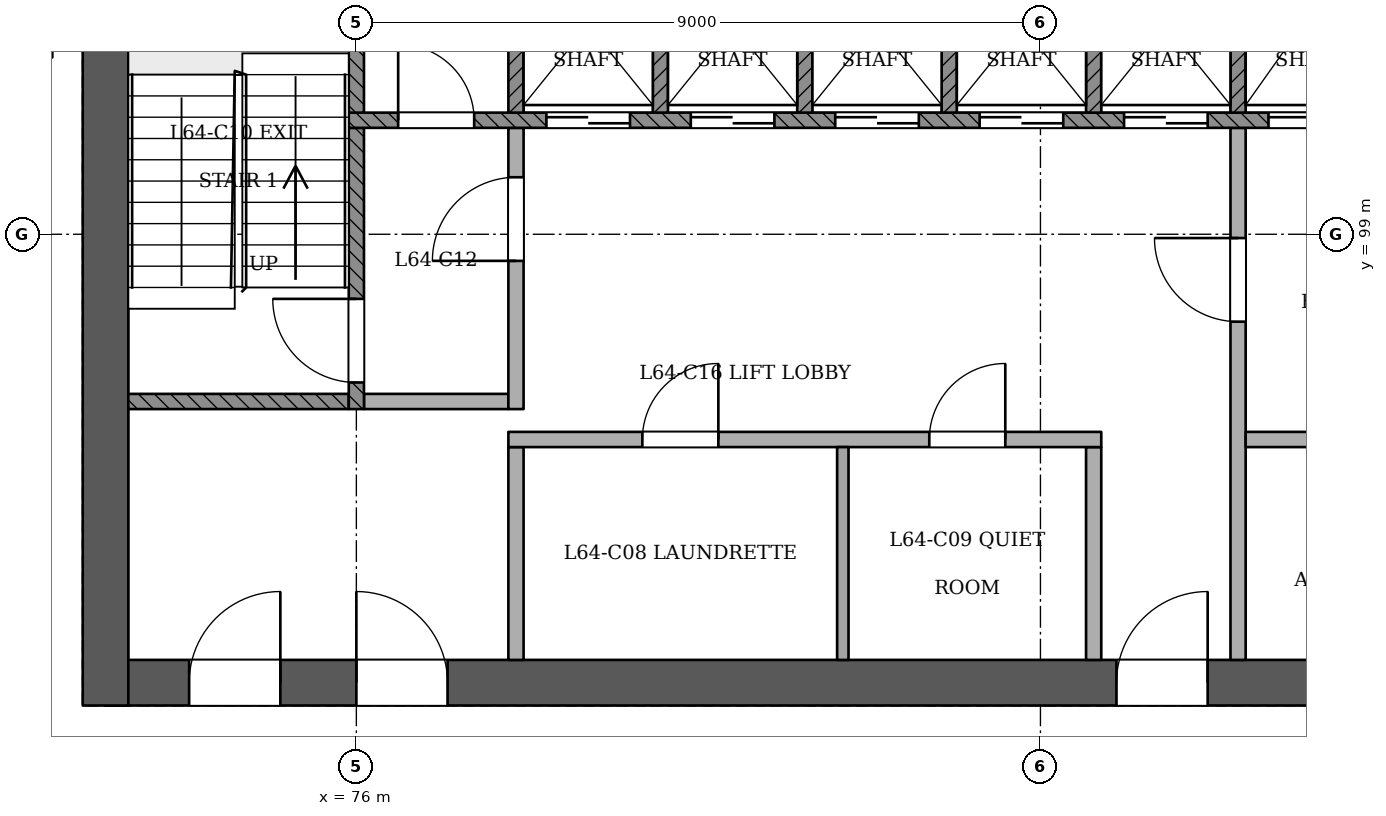
"""IFC4 building model, lengths in metres.
Left out: names, types, materials, properties, quantities, classifications, styles, units other than length and angle.
Written with IfcOpenShell. Run it as: python <this file> out.ifc"""

import sys

from ifc_helpers import new_model, si_unit, direction, frame, frame_2d, origin, place, context, subcontext, project, spatial, rectangle, extrude, element, fill, save


model = new_model("IFC4")
c1 = context("Model", 3, precision=1e-05, world=origin(), true_north=direction((0.0, 1.0)))
c2 = subcontext(c1, "Body", "Model", "MODEL_VIEW")
j1 = project(units=[si_unit("LENGTHUNIT", "METRE"), si_unit("PLANEANGLEUNIT", "RADIAN")], contexts=[c1])
p1 = place(None, origin())
s1 = spatial("IfcSite", under=j1, at=p1, CompositionType="ELEMENT")
p2 = place(p1, origin())
s2 = spatial("IfcBuilding", under=s1, at=p2, CompositionType="ELEMENT")
p3 = place(p2, frame((0.0, 0.0, 250.0)))
s3 = spatial("IfcBuildingStorey", under=s2, at=p3, CompositionType="ELEMENT", Elevation=250.0)
p4 = place(p3, frame((72.7, 93.1, 0.0), z_axis=(0.0, 0.0, 1.0), x_axis=(1.0, 0.0, 0.0)))
e1 = element("IfcWall", 1, at=p4, inside=s3, PredefinedType="SHEAR", context=c2, shape_type="SweptSolid", body=[
    extrude(rectangle(XDim=24.9, YDim=0.6, at=frame_2d((12.45, 0.0))), origin(), (0.0, 0.0, 1.0), 3.6),
])
p5 = place(p4, frame((1.1, 0.0, 0.0)))
e2 = element("IfcOpeningElement", 2, at=p5, cuts=e1, PredefinedType="OPENING", context=c2, shape_type="SweptSolid", body=[
    extrude(rectangle(XDim=1.2, YDim=2.1, at=frame_2d((0.6, 1.05))), frame((0.0, 0.311, 0.0), z_axis=(0.0, -1.0, 0.0), x_axis=(1.0, 0.0, 0.0)), (0.0, 0.0, 1.0), 0.621),
])
p6 = place(p4, frame((3.3, 0.0, 0.0)))
e3 = element("IfcOpeningElement", 3, at=p6, cuts=e1, PredefinedType="OPENING", context=c2, shape_type="SweptSolid", body=[
    extrude(rectangle(XDim=1.2, YDim=2.1, at=frame_2d((0.6, 1.05))), frame((0.0, 0.311, 0.0), z_axis=(0.0, -1.0, 0.0), x_axis=(1.0, 0.0, 0.0)), (0.0, 0.0, 1.0), 0.621),
])
p7 = place(p4, frame((13.3, 0.0, 0.0)))
e4 = element("IfcOpeningElement", 4, at=p7, cuts=e1, PredefinedType="OPENING", context=c2, shape_type="SweptSolid", body=[
    extrude(rectangle(XDim=1.2, YDim=2.1, at=frame_2d((0.6, 1.05))), frame((0.0, 0.311, 0.0), z_axis=(0.0, -1.0, 0.0), x_axis=(1.0, 0.0, 0.0)), (0.0, 0.0, 1.0), 0.621),
])
p8 = place(p4, frame((16.012, 0.0, 0.0)))
e5 = element("IfcOpeningElement", 5, at=p8, cuts=e1, PredefinedType="OPENING", context=c2, shape_type="SweptSolid", body=[
    extrude(rectangle(XDim=1.0, YDim=2.1, at=frame_2d((0.5, 1.05))), frame((0.0, 0.311, 0.0), z_axis=(0.0, -1.0, 0.0), x_axis=(1.0, 0.0, 0.0)), (0.0, 0.0, 1.0), 0.621),
])
p9 = place(p4, frame((19.9, 0.0, 0.0)))
e6 = element("IfcOpeningElement", 6, at=p9, cuts=e1, PredefinedType="OPENING", context=c2, shape_type="SweptSolid", body=[
    extrude(rectangle(XDim=1.0, YDim=2.1, at=frame_2d((0.5, 1.05))), frame((0.0, 0.311, 0.0), z_axis=(0.0, -1.0, 0.0), x_axis=(1.0, 0.0, 0.0)), (0.0, 0.0, 1.0), 0.621),
])
p10 = place(p4, frame((23.038, 0.0, 0.0)))
e7 = element("IfcOpeningElement", 7, at=p10, cuts=e1, PredefinedType="OPENING", context=c2, shape_type="SweptSolid", body=[
    extrude(rectangle(XDim=1.0, YDim=2.1, at=frame_2d((0.5, 1.05))), frame((0.0, 0.311, 0.0), z_axis=(0.0, -1.0, 0.0), x_axis=(1.0, 0.0, 0.0)), (0.0, 0.0, 1.0), 0.621),
])
p11 = place(p3, frame((72.7, 103.7, 0.0), z_axis=(0.0, 0.0, 1.0), x_axis=(0.0, -1.0, 0.0)))
e8 = element("IfcWall", 8, at=p11, inside=s3, PredefinedType="SHEAR", context=c2, shape_type="SweptSolid", body=[
    extrude(rectangle(XDim=10.9, YDim=0.6, at=frame_2d((5.45, 0.0))), origin(), (0.0, 0.0, 1.0), 3.6),
])
p12 = place(p3, frame((78.1, 93.4, 0.0), z_axis=(0.0, 0.0, 1.0), x_axis=(0.0, 1.0, 0.0)))
e9 = element("IfcWall", 9, at=p12, inside=s3, PredefinedType="PARTITIONING", context=c2, shape_type="SweptSolid", body=[
    extrude(rectangle(XDim=2.8, YDim=0.2, at=frame_2d((1.4, 0.0))), origin(), (0.0, 0.0, 1.0), 3.2),
])
p13 = place(p3, frame((82.4, 93.4, 0.0), z_axis=(0.0, 0.0, 1.0), x_axis=(0.0, 1.0, 0.0)))
e10 = element("IfcWall", 10, at=p13, inside=s3, PredefinedType="PARTITIONING", context=c2, shape_type="SweptSolid", body=[
    extrude(rectangle(XDim=2.8, YDim=0.15, at=frame_2d((1.4, 0.0))), origin(), (0.0, 0.0, 1.0), 3.2),
])
p14 = place(p3, frame((85.7, 93.4, 0.0), z_axis=(0.0, 0.0, 1.0), x_axis=(0.0, 1.0, 0.0)))
e11 = element("IfcWall", 11, at=p14, inside=s3, PredefinedType="PARTITIONING", context=c2, shape_type="SweptSolid", body=[
    extrude(rectangle(XDim=2.8, YDim=0.2, at=frame_2d((1.4, 0.0))), origin(), (0.0, 0.0, 1.0), 3.2),
])
p15 = place(p3, frame((87.6, 93.4, 0.0), z_axis=(0.0, 0.0, 1.0), x_axis=(0.0, 1.0, 0.0)))
e12 = element("IfcWall", 12, at=p15, inside=s3, PredefinedType="PARTITIONING", context=c2, shape_type="SweptSolid", body=[
    extrude(rectangle(XDim=7.0, YDim=0.2, at=frame_2d((3.5, 0.0))), origin(), (0.0, 0.0, 1.0), 3.2),
])
p16 = place(p15, frame((4.45, 0.0, 0.0)))
e13 = element("IfcOpeningElement", 13, at=p16, cuts=e12, PredefinedType="OPENING", context=c2, shape_type="SweptSolid", body=[
    extrude(rectangle(XDim=1.1, YDim=2.1, at=frame_2d((0.55, 1.05))), frame((0.0, 0.11, 0.0), z_axis=(0.0, -1.0, 0.0), x_axis=(1.0, 0.0, 0.0)), (0.0, 0.0, 1.0), 0.221),
])
p17 = place(p3, frame((78.0, 96.3, 0.0), z_axis=(0.0, 0.0, 1.0), x_axis=(1.0, 0.0, 0.0)))
e14 = element("IfcWall", 14, at=p17, inside=s3, PredefinedType="PARTITIONING", context=c2, shape_type="SweptSolid", body=[
    extrude(rectangle(XDim=7.8, YDim=0.2, at=frame_2d((3.9, 0.0))), origin(), (0.0, 0.0, 1.0), 3.2),
])
p18 = place(p17, frame((1.762, 0.0, 0.0)))
e15 = element("IfcOpeningElement", 15, at=p18, cuts=e14, PredefinedType="OPENING", context=c2, shape_type="SweptSolid", body=[
    extrude(rectangle(XDim=1.0, YDim=2.1, at=frame_2d((0.5, 1.05))), frame((0.0, 0.11, 0.0), z_axis=(0.0, -1.0, 0.0), x_axis=(1.0, 0.0, 0.0)), (0.0, 0.0, 1.0), 0.221),
])
p19 = place(p17, frame((5.538, 0.0, 0.0)))
e16 = element("IfcOpeningElement", 16, at=p19, cuts=e14, PredefinedType="OPENING", context=c2, shape_type="SweptSolid", body=[
    extrude(rectangle(XDim=1.0, YDim=2.1, at=frame_2d((0.5, 1.05))), frame((0.0, 0.11, 0.0), z_axis=(0.0, -1.0, 0.0), x_axis=(1.0, 0.0, 0.0)), (0.0, 0.0, 1.0), 0.221),
])
p20 = place(p3, frame((87.7, 96.3, 0.0), z_axis=(0.0, 0.0, 1.0), x_axis=(1.0, 0.0, 0.0)))
e17 = element("IfcWall", 17, at=p20, inside=s3, PredefinedType="PARTITIONING", context=c2, shape_type="SweptSolid", body=[
    extrude(rectangle(XDim=3.6, YDim=0.2, at=frame_2d((1.8, 0.0))), origin(), (0.0, 0.0, 1.0), 3.2),
])
p21 = place(p3, frame((73.0, 96.8, 0.0), z_axis=(0.0, 0.0, 1.0), x_axis=(1.0, 0.0, 0.0)))
e18 = element("IfcWall", 18, at=p21, inside=s3, PredefinedType="SOLIDWALL", context=c2, shape_type="SweptSolid", body=[
    extrude(rectangle(XDim=2.9, YDim=0.2, at=frame_2d((1.45, 0.0))), origin(), (0.0, 0.0, 1.0), 3.2),
])
p22 = place(p3, frame((76.0, 96.7, 0.0), z_axis=(0.0, 0.0, 1.0), x_axis=(0.0, 1.0, 0.0)))
e19 = element("IfcWall", 19, at=p22, inside=s3, PredefinedType="SOLIDWALL", context=c2, shape_type="SweptSolid", body=[
    extrude(rectangle(XDim=3.7, YDim=0.2, at=frame_2d((1.85, 0.0))), origin(), (0.0, 0.0, 1.0), 3.2),
])
p23 = place(p22, frame((0.35, 0.0, 0.0)))
e20 = element("IfcOpeningElement", 20, at=p23, cuts=e19, PredefinedType="OPENING", context=c2, shape_type="SweptSolid", body=[
    extrude(rectangle(XDim=1.1, YDim=2.1, at=frame_2d((0.55, 1.05))), frame((0.0, 0.11, 0.0), z_axis=(0.0, -1.0, 0.0), x_axis=(1.0, 0.0, 0.0)), (0.0, 0.0, 1.0), 0.221),
])
p24 = place(p3, frame((76.1, 96.8, 0.0), z_axis=(0.0, 0.0, 1.0), x_axis=(1.0, 0.0, 0.0)))
e21 = element("IfcWall", 21, at=p24, inside=s3, PredefinedType="PARTITIONING", context=c2, shape_type="SweptSolid", body=[
    extrude(rectangle(XDim=1.9, YDim=0.2, at=frame_2d((0.95, 0.0))), origin(), (0.0, 0.0, 1.0), 3.2),
])
p25 = place(p3, frame((78.1, 96.7, 0.0), z_axis=(0.0, 0.0, 1.0), x_axis=(0.0, 1.0, 0.0)))
e22 = element("IfcWall", 22, at=p25, inside=s3, PredefinedType="PARTITIONING", context=c2, shape_type="SweptSolid", body=[
    extrude(rectangle(XDim=3.7, YDim=0.2, at=frame_2d((1.85, 0.0))), origin(), (0.0, 0.0, 1.0), 3.2),
])
p26 = place(p25, frame((1.95, 0.0, 0.0)))
e23 = element("IfcOpeningElement", 23, at=p26, cuts=e22, PredefinedType="OPENING", context=c2, shape_type="SweptSolid", body=[
    extrude(rectangle(XDim=1.1, YDim=2.1, at=frame_2d((0.55, 1.05))), frame((0.0, 0.11, 0.0), z_axis=(0.0, -1.0, 0.0), x_axis=(1.0, 0.0, 0.0)), (0.0, 0.0, 1.0), 0.221),
])
p27 = place(p3, frame((75.9, 100.5, 0.0), z_axis=(0.0, 0.0, 1.0), x_axis=(1.0, 0.0, 0.0)))
e24 = element("IfcWall", 24, at=p27, inside=s3, PredefinedType="SOLIDWALL", context=c2, shape_type="SweptSolid", body=[
    extrude(rectangle(XDim=18.2, YDim=0.2, at=frame_2d((9.1, 0.0))), origin(), (0.0, 0.0, 1.0), 3.2),
])
p28 = place(p27, frame((2.6, 0.0, 0.0)))
e25 = element("IfcOpeningElement", 25, at=p28, cuts=e24, PredefinedType="OPENING", context=c2, shape_type="SweptSolid", body=[
    extrude(rectangle(XDim=1.1, YDim=2.1, at=frame_2d((0.55, 1.05))), frame((0.0, 0.11, 0.0), z_axis=(0.0, -1.0, 0.0), x_axis=(1.0, 0.0, 0.0)), (0.0, 0.0, 1.0), 0.221),
])
p29 = place(p27, frame((4.5, 0.0, 0.0)))
e26 = element("IfcOpeningElement", 26, at=p29, cuts=e24, PredefinedType="OPENING", context=c2, shape_type="SweptSolid", body=[
    extrude(rectangle(XDim=1.1, YDim=2.1, at=frame_2d((0.55, 1.05))), frame((0.0, 0.11, 0.0), z_axis=(0.0, -1.0, 0.0), x_axis=(1.0, 0.0, 0.0)), (0.0, 0.0, 1.0), 0.221),
])
p30 = place(p27, frame((6.4, 0.0, 0.0)))
e27 = element("IfcOpeningElement", 27, at=p30, cuts=e24, PredefinedType="OPENING", context=c2, shape_type="SweptSolid", body=[
    extrude(rectangle(XDim=1.1, YDim=2.1, at=frame_2d((0.55, 1.05))), frame((0.0, 0.11, 0.0), z_axis=(0.0, -1.0, 0.0), x_axis=(1.0, 0.0, 0.0)), (0.0, 0.0, 1.0), 0.221),
])
p31 = place(p27, frame((8.3, 0.0, 0.0)))
e28 = element("IfcOpeningElement", 28, at=p31, cuts=e24, PredefinedType="OPENING", context=c2, shape_type="SweptSolid", body=[
    extrude(rectangle(XDim=1.1, YDim=2.1, at=frame_2d((0.55, 1.05))), frame((0.0, 0.11, 0.0), z_axis=(0.0, -1.0, 0.0), x_axis=(1.0, 0.0, 0.0)), (0.0, 0.0, 1.0), 0.221),
])
p32 = place(p27, frame((10.2, 0.0, 0.0)))
e29 = element("IfcOpeningElement", 29, at=p32, cuts=e24, PredefinedType="OPENING", context=c2, shape_type="SweptSolid", body=[
    extrude(rectangle(XDim=1.1, YDim=2.1, at=frame_2d((0.55, 1.05))), frame((0.0, 0.11, 0.0), z_axis=(0.0, -1.0, 0.0), x_axis=(1.0, 0.0, 0.0)), (0.0, 0.0, 1.0), 0.221),
])
p33 = place(p27, frame((12.1, 0.0, 0.0)))
e30 = element("IfcOpeningElement", 30, at=p33, cuts=e24, PredefinedType="OPENING", context=c2, shape_type="SweptSolid", body=[
    extrude(rectangle(XDim=1.1, YDim=2.1, at=frame_2d((0.55, 1.05))), frame((0.0, 0.11, 0.0), z_axis=(0.0, -1.0, 0.0), x_axis=(1.0, 0.0, 0.0)), (0.0, 0.0, 1.0), 0.221),
])
p34 = place(p27, frame((14.0, 0.0, 0.0)))
e31 = element("IfcOpeningElement", 31, at=p34, cuts=e24, PredefinedType="OPENING", context=c2, shape_type="SweptSolid", body=[
    extrude(rectangle(XDim=1.1, YDim=2.1, at=frame_2d((0.55, 1.05))), frame((0.0, 0.11, 0.0), z_axis=(0.0, -1.0, 0.0), x_axis=(1.0, 0.0, 0.0)), (0.0, 0.0, 1.0), 0.221),
])
p35 = place(p27, frame((0.65, 0.0, 0.0)))
e32 = element("IfcOpeningElement", 32, at=p35, cuts=e24, PredefinedType="OPENING", context=c2, shape_type="SweptSolid", body=[
    extrude(rectangle(XDim=1.0, YDim=2.1, at=frame_2d((0.5, 1.05))), frame((0.0, 0.11, 0.0), z_axis=(0.0, -1.0, 0.0), x_axis=(1.0, 0.0, 0.0)), (0.0, 0.0, 1.0), 0.221),
])
p36 = place(p27, frame((16.3, 0.0, 0.0)))
e33 = element("IfcOpeningElement", 33, at=p36, cuts=e24, PredefinedType="OPENING", context=c2, shape_type="SweptSolid", body=[
    extrude(rectangle(XDim=1.0, YDim=2.1, at=frame_2d((0.5, 1.05))), frame((0.0, 0.11, 0.0), z_axis=(0.0, -1.0, 0.0), x_axis=(1.0, 0.0, 0.0)), (0.0, 0.0, 1.0), 0.221),
])
for number, where, z_axis, x_axis in (
    (34, (76.0, 100.6, 0.0), (0.0, 0.0, 1.0), (0.0, 1.0, 0.0)),
    (35, (78.1, 100.6, 0.0), (0.0, 0.0, 1.0), (0.0, 1.0, 0.0)),
    (36, (80.0, 100.6, 0.0), (0.0, 0.0, 1.0), (0.0, 1.0, 0.0)),
    (37, (81.9, 100.6, 0.0), (0.0, 0.0, 1.0), (0.0, 1.0, 0.0)),
    (38, (83.8, 100.6, 0.0), (0.0, 0.0, 1.0), (0.0, 1.0, 0.0)),
    (39, (85.7, 100.6, 0.0), (0.0, 0.0, 1.0), (0.0, 1.0, 0.0)),
    (40, (87.6, 100.6, 0.0), (0.0, 0.0, 1.0), (0.0, 1.0, 0.0)),
):
    element("IfcWall", number, at=place(p3, frame(where, z_axis=z_axis, x_axis=x_axis)), inside=s3, PredefinedType="SOLIDWALL", context=c2, shape_type="SweptSolid", body=[
        extrude(rectangle(XDim=2.8, YDim=0.2, at=frame_2d((1.4, 0.0))), origin(), (0.0, 0.0, 1.0), 3.2),
    ])
p37 = place(p28, origin())
e41 = element("IfcDoor", 41, at=p37, inside=s3, OperationType="SLIDING_TO_RIGHT", PredefinedType="NOTDEFINED", context=c2, shape_type="SweptSolid", body=[
    extrude(rectangle(XDim=1.1, YDim=2.1, at=frame_2d((0.55, 1.05))), frame((0.0, 0.025, 0.0), z_axis=(0.0, -1.0, 0.0), x_axis=(1.0, 0.0, 0.0)), (0.0, 0.0, 1.0), 0.05),
])
fill(e25, e41)
p38 = place(p29, origin())
e42 = element("IfcDoor", 42, at=p38, inside=s3, OperationType="SLIDING_TO_LEFT", PredefinedType="NOTDEFINED", context=c2, shape_type="SweptSolid", body=[
    extrude(rectangle(XDim=1.1, YDim=2.1, at=frame_2d((0.55, 1.05))), frame((0.0, 0.025, 0.0), z_axis=(0.0, -1.0, 0.0), x_axis=(1.0, 0.0, 0.0)), (0.0, 0.0, 1.0), 0.05),
])
fill(e26, e42)
p39 = place(p30, origin())
e43 = element("IfcDoor", 43, at=p39, inside=s3, OperationType="SLIDING_TO_RIGHT", PredefinedType="NOTDEFINED", context=c2, shape_type="SweptSolid", body=[
    extrude(rectangle(XDim=1.1, YDim=2.1, at=frame_2d((0.55, 1.05))), frame((0.0, 0.025, 0.0), z_axis=(0.0, -1.0, 0.0), x_axis=(1.0, 0.0, 0.0)), (0.0, 0.0, 1.0), 0.05),
])
fill(e27, e43)
p40 = place(p31, origin())
e44 = element("IfcDoor", 44, at=p40, inside=s3, OperationType="SLIDING_TO_LEFT", PredefinedType="NOTDEFINED", context=c2, shape_type="SweptSolid", body=[
    extrude(rectangle(XDim=1.1, YDim=2.1, at=frame_2d((0.55, 1.05))), frame((0.0, 0.025, 0.0), z_axis=(0.0, -1.0, 0.0), x_axis=(1.0, 0.0, 0.0)), (0.0, 0.0, 1.0), 0.05),
])
fill(e28, e44)
p41 = place(p32, origin())
e45 = element("IfcDoor", 45, at=p41, inside=s3, OperationType="SLIDING_TO_RIGHT", PredefinedType="NOTDEFINED", context=c2, shape_type="SweptSolid", body=[
    extrude(rectangle(XDim=1.1, YDim=2.1, at=frame_2d((0.55, 1.05))), frame((0.0, 0.025, 0.0), z_axis=(0.0, -1.0, 0.0), x_axis=(1.0, 0.0, 0.0)), (0.0, 0.0, 1.0), 0.05),
])
fill(e29, e45)
p42 = place(p33, origin())
e46 = element("IfcDoor", 46, at=p42, inside=s3, OperationType="SLIDING_TO_RIGHT", PredefinedType="NOTDEFINED", context=c2, shape_type="SweptSolid", body=[
    extrude(rectangle(XDim=1.1, YDim=2.1, at=frame_2d((0.55, 1.05))), frame((0.0, 0.025, 0.0), z_axis=(0.0, -1.0, 0.0), x_axis=(1.0, 0.0, 0.0)), (0.0, 0.0, 1.0), 0.05),
])
fill(e30, e46)
p43 = place(p23, origin())
e47 = element("IfcDoor", 47, at=p43, inside=s3, OperationType="SINGLE_SWING_RIGHT", PredefinedType="NOTDEFINED", context=c2, shape_type="SweptSolid", body=[
    extrude(rectangle(XDim=1.1, YDim=2.1, at=frame_2d((0.55, 1.05))), frame((0.0, 0.025, 0.0), z_axis=(0.0, -1.0, 0.0), x_axis=(1.0, 0.0, 0.0)), (0.0, 0.0, 1.0), 0.05),
])
fill(e20, e47)
p44 = place(p26, origin())
e48 = element("IfcDoor", 48, at=p44, inside=s3, OperationType="SINGLE_SWING_LEFT", PredefinedType="NOTDEFINED", context=c2, shape_type="SweptSolid", body=[
    extrude(rectangle(XDim=1.1, YDim=2.1, at=frame_2d((0.55, 1.05))), frame((0.0, 0.025, 0.0), z_axis=(0.0, -1.0, 0.0), x_axis=(1.0, 0.0, 0.0)), (0.0, 0.0, 1.0), 0.05),
])
fill(e23, e48)
p45 = place(p16, origin())
e49 = element("IfcDoor", 49, at=p45, inside=s3, OperationType="SINGLE_SWING_RIGHT", PredefinedType="NOTDEFINED", context=c2, shape_type="SweptSolid", body=[
    extrude(rectangle(XDim=1.1, YDim=2.1, at=frame_2d((0.55, 1.05))), frame((0.0, 0.025, 0.0), z_axis=(0.0, -1.0, 0.0), x_axis=(1.0, 0.0, 0.0)), (0.0, 0.0, 1.0), 0.05),
])
fill(e13, e49)
p46 = place(p5, origin())
e50 = element("IfcDoor", 50, at=p46, inside=s3, OperationType="SINGLE_SWING_RIGHT", PredefinedType="NOTDEFINED", context=c2, shape_type="SweptSolid", body=[
    extrude(rectangle(XDim=1.2, YDim=2.1, at=frame_2d((0.6, 1.05))), frame((0.0, 0.025, 0.0), z_axis=(0.0, -1.0, 0.0), x_axis=(1.0, 0.0, 0.0)), (0.0, 0.0, 1.0), 0.05),
])
fill(e2, e50)
p47 = place(p6, origin())
e51 = element("IfcDoor", 51, at=p47, inside=s3, OperationType="SINGLE_SWING_LEFT", PredefinedType="NOTDEFINED", context=c2, shape_type="SweptSolid", body=[
    extrude(rectangle(XDim=1.2, YDim=2.1, at=frame_2d((0.6, 1.05))), frame((0.0, 0.025, 0.0), z_axis=(0.0, -1.0, 0.0), x_axis=(1.0, 0.0, 0.0)), (0.0, 0.0, 1.0), 0.05),
])
fill(e3, e51)
p48 = place(p7, origin())
e52 = element("IfcDoor", 52, at=p48, inside=s3, OperationType="SINGLE_SWING_RIGHT", PredefinedType="NOTDEFINED", context=c2, shape_type="SweptSolid", body=[
    extrude(rectangle(XDim=1.2, YDim=2.1, at=frame_2d((0.6, 1.05))), frame((0.0, 0.025, 0.0), z_axis=(0.0, -1.0, 0.0), x_axis=(1.0, 0.0, 0.0)), (0.0, 0.0, 1.0), 0.05),
])
fill(e4, e52)
p49 = place(p35, origin())
e53 = element("IfcDoor", 53, at=p49, inside=s3, OperationType="SINGLE_SWING_LEFT", PredefinedType="NOTDEFINED", context=c2, shape_type="SweptSolid", body=[
    extrude(rectangle(XDim=1.0, YDim=2.1, at=frame_2d((0.5, 1.05))), frame((0.0, 0.025, 0.0), z_axis=(0.0, -1.0, 0.0), x_axis=(1.0, 0.0, 0.0)), (0.0, 0.0, 1.0), 0.05),
])
fill(e32, e53)
p50 = place(p18, origin())
e54 = element("IfcDoor", 54, at=p50, inside=s3, OperationType="SINGLE_SWING_RIGHT", PredefinedType="NOTDEFINED", context=c2, shape_type="SweptSolid", body=[
    extrude(rectangle(XDim=1.0, YDim=2.1, at=frame_2d((0.5, 1.05))), frame((0.0, 0.025, 0.0), z_axis=(0.0, -1.0, 0.0), x_axis=(1.0, 0.0, 0.0)), (0.0, 0.0, 1.0), 0.05),
])
fill(e15, e54)
p51 = place(p19, origin())
e55 = element("IfcDoor", 55, at=p51, inside=s3, OperationType="SINGLE_SWING_RIGHT", PredefinedType="NOTDEFINED", context=c2, shape_type="SweptSolid", body=[
    extrude(rectangle(XDim=1.0, YDim=2.1, at=frame_2d((0.5, 1.05))), frame((0.0, 0.025, 0.0), z_axis=(0.0, -1.0, 0.0), x_axis=(1.0, 0.0, 0.0)), (0.0, 0.0, 1.0), 0.05),
])
fill(e16, e55)
save(model, sys.argv[1])
